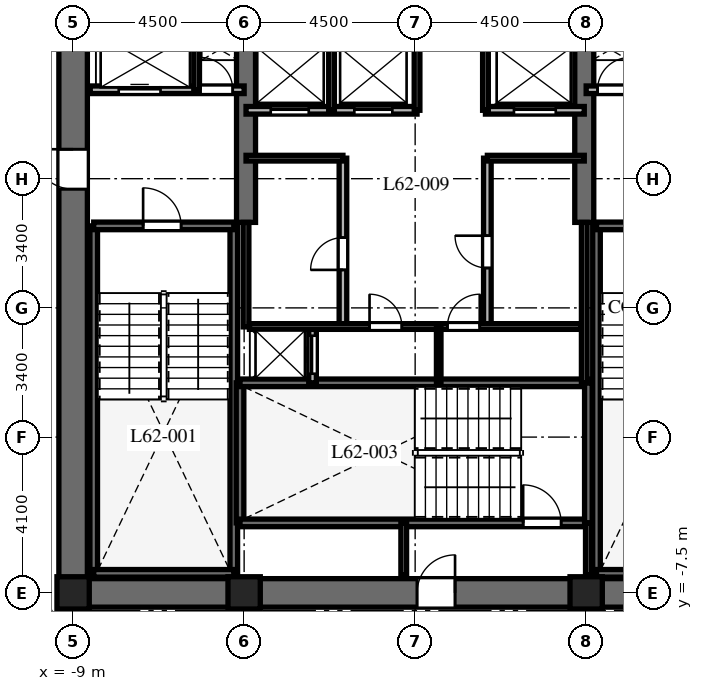
"""IFC4 building model, lengths in metres.
Left out: names, types, materials, properties, quantities, classifications, styles, units other than length and angle.
Written with IfcOpenShell. Run it as: python <this file> out.ifc"""

import sys

from ifc_helpers import new_model, si_unit, direction, frame, frame_2d, origin, origin_2d, place, context, subcontext, project, spatial, rectangle, extrude, element, fill, save


model = new_model("IFC4")
c1 = context("Model", 3, precision=1e-05, world=origin(), true_north=direction((0.0, 1.0)))
c2 = subcontext(c1, "Body", "Model", "MODEL_VIEW")
j1 = project(units=[si_unit("LENGTHUNIT", "METRE"), si_unit("PLANEANGLEUNIT", "RADIAN")], contexts=[c1])
p1 = place(None, origin())
s1 = spatial("IfcSite", under=j1, at=p1, CompositionType="ELEMENT")
p2 = place(p1, origin())
s2 = spatial("IfcBuilding", under=s1, at=p2, CompositionType="ELEMENT")
p3 = place(p2, frame((0.0, 0.0, 248.3)))
s3 = spatial("IfcBuildingStorey", under=s2, at=p3, CompositionType="ELEMENT", Elevation=248.3)
p4 = place(p3, frame((-9.375, -7.5, 0.0), z_axis=(0.0, 0.0, 1.0), x_axis=(1.0, 0.0, 0.0)))
e1 = element("IfcWall", 1, at=p4, inside=s3, PredefinedType="SHEAR", context=c2, shape_type="SweptSolid", body=[
    extrude(rectangle(XDim=18.75, YDim=0.75, at=frame_2d((9.375, 0.0))), origin(), (0.0, 0.0, 1.0), 3.8),
])
p5 = place(p4, frame((9.425, 0.0, 0.0)))
e2 = element("IfcOpeningElement", 2, at=p5, cuts=e1, PredefinedType="OPENING", context=c2, shape_type="SweptSolid", body=[
    extrude(rectangle(XDim=1.0, YDim=2.15, at=frame_2d((0.5, 1.075))), frame((0.0, 0.385, 0.0), z_axis=(0.0, -1.0, 0.0), x_axis=(1.0, 0.0, 0.0)), (0.0, 0.0, 1.0), 0.77),
])
p6 = place(p3, frame((-9.0, -7.125, 0.0), z_axis=(0.0, 0.0, 1.0), x_axis=(0.0, 1.0, 0.0)))
e3 = element("IfcWall", 3, at=p6, inside=s3, PredefinedType="SHEAR", context=c2, shape_type="SweptSolid", body=[
    extrude(rectangle(XDim=14.25, YDim=0.75, at=frame_2d((7.125, 0.0))), origin(), (0.0, 0.0, 1.0), 3.8),
])
p7 = place(p6, frame((10.25, 0.0, 0.0)))
e4 = element("IfcOpeningElement", 4, at=p7, cuts=e3, PredefinedType="OPENING", context=c2, shape_type="SweptSolid", body=[
    extrude(rectangle(XDim=1.05, YDim=2.15, at=frame_2d((0.525, 1.075))), frame((0.0, 0.385, 0.0), z_axis=(0.0, -1.0, 0.0), x_axis=(1.0, 0.0, 0.0)), (0.0, 0.0, 1.0), 0.77),
])
for number, where, z_axis, x_axis in (
    (5, (-4.45, 2.25, 0.0), (0.0, 0.0, 1.0), (0.0, 1.0, 0.0)),
    (6, (4.45, 2.25, 0.0), (0.0, 0.0, 1.0), (0.0, 1.0, 0.0)),
):
    element("IfcWall", number, at=place(p3, frame(where, z_axis=z_axis, x_axis=x_axis)), inside=s3, PredefinedType="SHEAR", context=c2, shape_type="SweptSolid", body=[
        extrude(rectangle(XDim=4.875, YDim=0.5, at=frame_2d((2.438, 0.0))), origin(), (0.0, 0.0, 1.0), 3.8),
    ])
for number, where, z_axis, x_axis in (
    (7, (-8.458, -6.985, 0.0), (0.0, 0.0, 1.0), (0.0, 1.0, 0.0)),
    (8, (-4.772, -6.985, 0.0), (0.0, 0.0, 1.0), (0.0, 1.0, 0.0)),
):
    element("IfcWall", number, at=place(p3, frame(where, z_axis=z_axis, x_axis=x_axis)), inside=s3, PredefinedType="SHEAR", context=c2, shape_type="SweptSolid", body=[
        extrude(rectangle(XDim=9.143, YDim=0.2, at=frame_2d((4.572, 0.0))), origin(), (0.0, 0.0, 1.0), 3.8),
    ])
p8 = place(p3, frame((-8.458, -6.985, 0.0), z_axis=(0.0, 0.0, 1.0), x_axis=(1.0, 0.0, 0.0)))
e9 = element("IfcWall", 9, at=p8, inside=s3, PredefinedType="SHEAR", context=c2, shape_type="SweptSolid", body=[
    extrude(rectangle(XDim=3.686, YDim=0.2, at=frame_2d((1.843, 0.0))), origin(), (0.0, 0.0, 1.0), 3.8),
])
p9 = place(p3, frame((-8.458, 2.158, 0.0), z_axis=(0.0, 0.0, 1.0), x_axis=(1.0, 0.0, 0.0)))
e10 = element("IfcWall", 10, at=p9, inside=s3, PredefinedType="SHEAR", context=c2, shape_type="SweptSolid", body=[
    extrude(rectangle(XDim=3.686, YDim=0.2, at=frame_2d((1.843, 0.0))), origin(), (0.0, 0.0, 1.0), 3.8),
])
p10 = place(p9, frame((1.3, 0.0, 0.0)))
e11 = element("IfcOpeningElement", 11, at=p10, cuts=e10, PredefinedType="OPENING", context=c2, shape_type="SweptSolid", body=[
    extrude(rectangle(XDim=1.0, YDim=2.15, at=frame_2d((0.5, 1.075))), frame((0.0, 0.11, 0.0), z_axis=(0.0, -1.0, 0.0), x_axis=(1.0, 0.0, 0.0)), (0.0, 0.0, 1.0), 0.22),
])
p11 = place(p3, frame((4.772, -6.985, 0.0), z_axis=(0.0, 0.0, 1.0), x_axis=(0.0, 1.0, 0.0)))
e12 = element("IfcWall", 12, at=p11, inside=s3, PredefinedType="SHEAR", context=c2, shape_type="SweptSolid", body=[
    extrude(rectangle(XDim=9.143, YDim=0.2, at=frame_2d((4.572, 0.0))), origin(), (0.0, 0.0, 1.0), 3.8),
])
p12 = place(p3, frame((4.772, -6.985, 0.0), z_axis=(0.0, 0.0, 1.0), x_axis=(1.0, 0.0, 0.0)))
e13 = element("IfcWall", 13, at=p12, inside=s3, PredefinedType="SHEAR", context=c2, shape_type="SweptSolid", body=[
    extrude(rectangle(XDim=3.686, YDim=0.2, at=frame_2d((1.843, 0.0))), origin(), (0.0, 0.0, 1.0), 3.8),
])
p13 = place(p3, frame((4.772, 2.158, 0.0), z_axis=(0.0, 0.0, 1.0), x_axis=(1.0, 0.0, 0.0)))
e14 = element("IfcWall", 14, at=p13, inside=s3, PredefinedType="SHEAR", context=c2, shape_type="SweptSolid", body=[
    extrude(rectangle(XDim=3.686, YDim=0.2, at=frame_2d((1.843, 0.0))), origin(), (0.0, 0.0, 1.0), 3.8),
])
p14 = place(p13, frame((1.35, 0.0, 0.0)))
e15 = element("IfcOpeningElement", 15, at=p14, cuts=e14, PredefinedType="OPENING", context=c2, shape_type="SweptSolid", body=[
    extrude(rectangle(XDim=1.0, YDim=2.15, at=frame_2d((0.5, 1.075))), frame((0.0, 0.11, 0.0), z_axis=(0.0, -1.0, 0.0), x_axis=(1.0, 0.0, 0.0)), (0.0, 0.0, 1.0), 0.22),
])
p15 = place(p3, frame((-4.608, -5.658, 0.0), z_axis=(0.0, 0.0, 1.0), x_axis=(0.0, 1.0, 0.0)))
e16 = element("IfcWall", 16, at=p15, inside=s3, PredefinedType="SHEAR", context=c2, shape_type="SweptSolid", body=[
    extrude(rectangle(XDim=3.686, YDim=0.2, at=frame_2d((1.843, 0.0))), origin(), (0.0, 0.0, 1.0), 3.8),
])
p16 = place(p3, frame((-4.608, -5.658, 0.0), z_axis=(0.0, 0.0, 1.0), x_axis=(1.0, 0.0, 0.0)))
e17 = element("IfcWall", 17, at=p16, inside=s3, PredefinedType="SHEAR", context=c2, shape_type="SweptSolid", body=[
    extrude(rectangle(XDim=9.166, YDim=0.2, at=frame_2d((4.583, 0.0))), origin(), (0.0, 0.0, 1.0), 3.8),
])
p17 = place(p16, frame((7.45, 0.0, 0.0)))
e18 = element("IfcOpeningElement", 18, at=p17, cuts=e17, PredefinedType="OPENING", context=c2, shape_type="SweptSolid", body=[
    extrude(rectangle(XDim=1.0, YDim=2.15, at=frame_2d((0.5, 1.075))), frame((0.0, 0.11, 0.0), z_axis=(0.0, -1.0, 0.0), x_axis=(1.0, 0.0, 0.0)), (0.0, 0.0, 1.0), 0.22),
])
p18 = place(p3, frame((-4.608, -1.972, 0.0), z_axis=(0.0, 0.0, 1.0), x_axis=(1.0, 0.0, 0.0)))
e19 = element("IfcWall", 19, at=p18, inside=s3, PredefinedType="SHEAR", context=c2, shape_type="SweptSolid", body=[
    extrude(rectangle(XDim=9.166, YDim=0.2, at=frame_2d((4.583, 0.0))), origin(), (0.0, 0.0, 1.0), 3.8),
])
p19 = place(p3, frame((4.558, -5.658, 0.0), z_axis=(0.0, 0.0, 1.0), x_axis=(0.0, 1.0, 0.0)))
e20 = element("IfcWall", 20, at=p19, inside=s3, PredefinedType="SHEAR", context=c2, shape_type="SweptSolid", body=[
    extrude(rectangle(XDim=3.686, YDim=0.2, at=frame_2d((1.843, 0.0))), origin(), (0.0, 0.0, 1.0), 3.8),
])
for number, where, z_axis, x_axis in (
    (21, (-9.0, -7.5, 0.0), (0.0, 0.0, 1.0), (1.0, 0.0, 0.0)),
    (22, (-4.5, -7.5, 0.0), (0.0, 0.0, 1.0), (1.0, 0.0, 0.0)),
    (23, (4.5, -7.5, 0.0), (0.0, 0.0, 1.0), (1.0, 0.0, 0.0)),
):
    element("IfcColumn", number, at=place(p3, frame(where, z_axis=z_axis, x_axis=x_axis)), inside=s3, PredefinedType="COLUMN", context=c2, shape_type="SweptSolid", body=[
        extrude(rectangle(XDim=0.85, YDim=0.85, at=origin_2d()), origin(), (0.0, 0.0, 1.0), 3.8),
    ])
for number, where, z_axis, x_axis in (
    (24, (-0.3, -7.02, 0.0), (0.0, 0.0, 1.0), (0.0, 1.0, 0.0)),
    (25, (4.558, -7.02, 0.0), (0.0, 0.0, 1.0), (0.0, 1.0, 0.0)),
):
    element("IfcWall", number, at=place(p3, frame(where, z_axis=z_axis, x_axis=x_axis)), inside=s3, PredefinedType="PARTITIONING", context=c2, shape_type="SweptSolid", body=[
        extrude(rectangle(XDim=1.362, YDim=0.15, at=frame_2d((0.681, 0.0))), origin(), (0.0, 0.0, 1.0), 3.5),
    ])
p20 = place(p3, frame((-8.55, 5.74, 0.0), z_axis=(0.0, 0.0, 1.0), x_axis=(1.0, 0.0, 0.0)))
e26 = element("IfcWall", 26, at=p20, inside=s3, PredefinedType="PARTITIONING", context=c2, shape_type="SweptSolid", body=[
    extrude(rectangle(XDim=4.05, YDim=0.2, at=frame_2d((2.025, 0.0))), origin(), (0.0, 0.0, 1.0), 3.5),
])
p21 = place(p20, frame((0.75, 0.0, 0.0)))
e27 = element("IfcOpeningElement", 27, at=p21, cuts=e26, PredefinedType="OPENING", context=c2, shape_type="SweptSolid", body=[
    extrude(rectangle(XDim=1.1, YDim=2.2, at=frame_2d((0.55, 1.1))), frame((0.0, 0.11, 0.0), z_axis=(0.0, -1.0, 0.0), x_axis=(1.0, 0.0, 0.0)), (0.0, 0.0, 1.0), 0.22),
])
p22 = place(p20, frame((2.9, 0.0, 0.0)))
e28 = element("IfcOpeningElement", 28, at=p22, cuts=e26, PredefinedType="OPENING", context=c2, shape_type="SweptSolid", body=[
    extrude(rectangle(XDim=0.85, YDim=2.03, at=frame_2d((0.425, 1.015))), frame((0.0, 0.11, 0.0), z_axis=(0.0, -1.0, 0.0), x_axis=(1.0, 0.0, 0.0)), (0.0, 0.0, 1.0), 0.22),
])
p23 = place(p3, frame((-5.75, 5.74, 0.0), z_axis=(0.0, 0.0, 1.0), x_axis=(0.0, 1.0, 0.0)))
e29 = element("IfcWall", 29, at=p23, inside=s3, PredefinedType="PARTITIONING", context=c2, shape_type="SweptSolid", body=[
    extrude(rectangle(XDim=1.41, YDim=0.15, at=frame_2d((0.705, 0.0))), origin(), (0.0, 0.0, 1.0), 3.5),
])
p24 = place(p3, frame((4.5, 5.74, 0.0), z_axis=(0.0, 0.0, 1.0), x_axis=(1.0, 0.0, 0.0)))
e30 = element("IfcWall", 30, at=p24, inside=s3, PredefinedType="PARTITIONING", context=c2, shape_type="SweptSolid", body=[
    extrude(rectangle(XDim=4.05, YDim=0.2, at=frame_2d((2.025, 0.0))), origin(), (0.0, 0.0, 1.0), 3.5),
])
p25 = place(p24, frame((0.3, 0.0, 0.0)))
e31 = element("IfcOpeningElement", 31, at=p25, cuts=e30, PredefinedType="OPENING", context=c2, shape_type="SweptSolid", body=[
    extrude(rectangle(XDim=0.85, YDim=2.03, at=frame_2d((0.425, 1.015))), frame((0.0, 0.11, 0.0), z_axis=(0.0, -1.0, 0.0), x_axis=(1.0, 0.0, 0.0)), (0.0, 0.0, 1.0), 0.22),
])
p26 = place(p24, frame((2.15, 0.0, 0.0)))
e32 = element("IfcOpeningElement", 32, at=p26, cuts=e30, PredefinedType="OPENING", context=c2, shape_type="SweptSolid", body=[
    extrude(rectangle(XDim=1.1, YDim=2.2, at=frame_2d((0.55, 1.1))), frame((0.0, 0.11, 0.0), z_axis=(0.0, -1.0, 0.0), x_axis=(1.0, 0.0, 0.0)), (0.0, 0.0, 1.0), 0.22),
])
p27 = place(p3, frame((-2.7, -1.972, 0.0), z_axis=(0.0, 0.0, 1.0), x_axis=(0.0, 1.0, 0.0)))
e33 = element("IfcWall", 33, at=p27, inside=s3, PredefinedType="PARTITIONING", context=c2, shape_type="SweptSolid", body=[
    extrude(rectangle(XDim=1.472, YDim=0.2, at=frame_2d((0.736, 0.0))), origin(), (0.0, 0.0, 1.0), 3.5),
])
p28 = place(p27, frame((0.24, 0.0, 0.0)))
e34 = element("IfcOpeningElement", 34, at=p28, cuts=e33, PredefinedType="OPENING", context=c2, shape_type="SweptSolid", body=[
    extrude(rectangle(XDim=1.0, YDim=2.2, at=frame_2d((0.5, 1.1))), frame((0.0, 0.11, 0.0), z_axis=(0.0, -1.0, 0.0), x_axis=(1.0, 0.0, 0.0)), (0.0, 0.0, 1.0), 0.22),
])
p29 = place(p3, frame((-4.45, 5.2, 0.0), z_axis=(0.0, 0.0, 1.0), x_axis=(1.0, 0.0, 0.0)))
e35 = element("IfcWall", 35, at=p29, inside=s3, PredefinedType="PARTITIONING", context=c2, shape_type="SweptSolid", body=[
    extrude(rectangle(XDim=4.5, YDim=0.2, at=frame_2d((2.25, 0.0))), origin(), (0.0, 0.0, 1.0), 3.5),
])
p30 = place(p29, frame((0.65, 0.0, 0.0)))
e36 = element("IfcOpeningElement", 36, at=p30, cuts=e35, PredefinedType="OPENING", context=c2, shape_type="SweptSolid", body=[
    extrude(rectangle(XDim=1.0, YDim=2.2, at=frame_2d((0.5, 1.1))), frame((0.0, 0.11, 0.0), z_axis=(0.0, -1.0, 0.0), x_axis=(1.0, 0.0, 0.0)), (0.0, 0.0, 1.0), 0.22),
])
p31 = place(p29, frame((2.85, 0.0, 0.0)))
e37 = element("IfcOpeningElement", 37, at=p31, cuts=e35, PredefinedType="OPENING", context=c2, shape_type="SweptSolid", body=[
    extrude(rectangle(XDim=1.0, YDim=2.2, at=frame_2d((0.5, 1.1))), frame((0.0, 0.11, 0.0), z_axis=(0.0, -1.0, 0.0), x_axis=(1.0, 0.0, 0.0)), (0.0, 0.0, 1.0), 0.22),
])
p32 = place(p3, frame((1.85, 5.2, 0.0), z_axis=(0.0, 0.0, 1.0), x_axis=(1.0, 0.0, 0.0)))
e38 = element("IfcWall", 38, at=p32, inside=s3, PredefinedType="PARTITIONING", context=c2, shape_type="SweptSolid", body=[
    extrude(rectangle(XDim=2.6, YDim=0.2, at=frame_2d((1.3, 0.0))), origin(), (0.0, 0.0, 1.0), 3.5),
])
p33 = place(p32, frame((0.75, 0.0, 0.0)))
e39 = element("IfcOpeningElement", 39, at=p33, cuts=e38, PredefinedType="OPENING", context=c2, shape_type="SweptSolid", body=[
    extrude(rectangle(XDim=1.1, YDim=2.2, at=frame_2d((0.55, 1.1))), frame((0.0, 0.11, 0.0), z_axis=(0.0, -1.0, 0.0), x_axis=(1.0, 0.0, 0.0)), (0.0, 0.0, 1.0), 0.22),
])
p34 = place(p3, frame((-2.2, 5.2, 0.0), z_axis=(0.0, 0.0, 1.0), x_axis=(0.0, 1.0, 0.0)))
e40 = element("IfcWall", 40, at=p34, inside=s3, PredefinedType="PARTITIONING", context=c2, shape_type="SweptSolid", body=[
    extrude(rectangle(XDim=1.85, YDim=0.15, at=frame_2d((0.925, 0.0))), origin(), (0.0, 0.0, 1.0), 3.5),
])
for number, where, z_axis, x_axis in (
    (41, (0.05, 5.2, 0.0), (0.0, 0.0, 1.0), (0.0, 1.0, 0.0)),
    (42, (1.85, 5.2, 0.0), (0.0, 0.0, 1.0), (0.0, 1.0, 0.0)),
):
    element("IfcWall", number, at=place(p3, frame(where, z_axis=z_axis, x_axis=x_axis)), inside=s3, PredefinedType="PARTITIONING", context=c2, shape_type="SweptSolid", body=[
        extrude(rectangle(XDim=1.95, YDim=0.15, at=frame_2d((0.975, 0.0))), origin(), (0.0, 0.0, 1.0), 3.5),
    ])
p35 = place(p3, frame((-4.45, -0.5, 0.0), z_axis=(0.0, 0.0, 1.0), x_axis=(0.0, 1.0, 0.0)))
e43 = element("IfcWall", 43, at=p35, inside=s3, PredefinedType="PARTITIONING", context=c2, shape_type="SweptSolid", body=[
    extrude(rectangle(XDim=2.75, YDim=0.15, at=frame_2d((1.375, 0.0))), origin(), (0.0, 0.0, 1.0), 3.5),
])
p36 = place(p3, frame((4.45, -1.972, 0.0), z_axis=(0.0, 0.0, 1.0), x_axis=(0.0, 1.0, 0.0)))
e44 = element("IfcWall", 44, at=p36, inside=s3, PredefinedType="PARTITIONING", context=c2, shape_type="SweptSolid", body=[
    extrude(rectangle(XDim=4.222, YDim=0.15, at=frame_2d((2.111, 0.0))), origin(), (0.0, 0.0, 1.0), 3.5),
])
p37 = place(p3, frame((-1.9, -0.5, 0.0), z_axis=(0.0, 0.0, 1.0), x_axis=(0.0, 1.0, 0.0)))
e45 = element("IfcWall", 45, at=p37, inside=s3, PredefinedType="PARTITIONING", context=c2, shape_type="SweptSolid", body=[
    extrude(rectangle(XDim=4.44, YDim=0.2, at=frame_2d((2.22, 0.0))), origin(), (0.0, 0.0, 1.0), 3.5),
])
p38 = place(p37, frame((1.5, 0.0, 0.0)))
e46 = element("IfcOpeningElement", 46, at=p38, cuts=e45, PredefinedType="OPENING", context=c2, shape_type="SweptSolid", body=[
    extrude(rectangle(XDim=0.85, YDim=2.03, at=frame_2d((0.425, 1.015))), frame((0.0, 0.11, 0.0), z_axis=(0.0, -1.0, 0.0), x_axis=(1.0, 0.0, 0.0)), (0.0, 0.0, 1.0), 0.22),
])
p39 = place(p3, frame((-4.45, 3.94, 0.0), z_axis=(0.0, 0.0, 1.0), x_axis=(1.0, 0.0, 0.0)))
e47 = element("IfcWall", 47, at=p39, inside=s3, PredefinedType="PARTITIONING", context=c2, shape_type="SweptSolid", body=[
    extrude(rectangle(XDim=2.55, YDim=0.15, at=frame_2d((1.275, 0.0))), origin(), (0.0, 0.0, 1.0), 3.5),
])
p40 = place(p3, frame((1.9, -0.5, 0.0), z_axis=(0.0, 0.0, 1.0), x_axis=(0.0, 1.0, 0.0)))
e48 = element("IfcWall", 48, at=p40, inside=s3, PredefinedType="PARTITIONING", context=c2, shape_type="SweptSolid", body=[
    extrude(rectangle(XDim=4.44, YDim=0.2, at=frame_2d((2.22, 0.0))), origin(), (0.0, 0.0, 1.0), 3.5),
])
p41 = place(p40, frame((1.55, 0.0, 0.0)))
e49 = element("IfcOpeningElement", 49, at=p41, cuts=e48, PredefinedType="OPENING", context=c2, shape_type="SweptSolid", body=[
    extrude(rectangle(XDim=0.85, YDim=2.03, at=frame_2d((0.425, 1.015))), frame((0.0, 0.11, 0.0), z_axis=(0.0, -1.0, 0.0), x_axis=(1.0, 0.0, 0.0)), (0.0, 0.0, 1.0), 0.22),
])
p42 = place(p3, frame((1.9, 3.94, 0.0), z_axis=(0.0, 0.0, 1.0), x_axis=(1.0, 0.0, 0.0)))
e50 = element("IfcWall", 50, at=p42, inside=s3, PredefinedType="PARTITIONING", context=c2, shape_type="SweptSolid", body=[
    extrude(rectangle(XDim=2.55, YDim=0.15, at=frame_2d((1.275, 0.0))), origin(), (0.0, 0.0, 1.0), 3.5),
])
p43 = place(p3, frame((-4.36, -0.49, 0.0), z_axis=(0.0, 0.0, 1.0), x_axis=(1.0, 0.0, 0.0)))
e51 = element("IfcWall", 51, at=p43, inside=s3, PredefinedType="PARTITIONING", context=c2, shape_type="SweptSolid", body=[
    extrude(rectangle(XDim=8.72, YDim=0.15, at=frame_2d((4.36, 0.0))), origin(), (0.0, 0.0, 1.0), 3.5),
])
p44 = place(p43, frame((3.16, 0.0, 0.0)))
e52 = element("IfcOpeningElement", 52, at=p44, cuts=e51, PredefinedType="OPENING", context=c2, shape_type="SweptSolid", body=[
    extrude(rectangle(XDim=0.85, YDim=2.03, at=frame_2d((0.425, 1.015))), frame((0.0, 0.085, 0.0), z_axis=(0.0, -1.0, 0.0), x_axis=(1.0, 0.0, 0.0)), (0.0, 0.0, 1.0), 0.17),
])
p45 = place(p43, frame((5.21, 0.0, 0.0)))
e53 = element("IfcOpeningElement", 53, at=p45, cuts=e51, PredefinedType="OPENING", context=c2, shape_type="SweptSolid", body=[
    extrude(rectangle(XDim=0.85, YDim=2.03, at=frame_2d((0.425, 1.015))), frame((0.0, 0.085, 0.0), z_axis=(0.0, -1.0, 0.0), x_axis=(1.0, 0.0, 0.0)), (0.0, 0.0, 1.0), 0.17),
])
p46 = place(p3, frame((0.62, -1.972, 0.0), z_axis=(0.0, 0.0, 1.0), x_axis=(0.0, 1.0, 0.0)))
e54 = element("IfcWall", 54, at=p46, inside=s3, PredefinedType="PARTITIONING", context=c2, shape_type="SweptSolid", body=[
    extrude(rectangle(XDim=1.472, YDim=0.12, at=frame_2d((0.736, 0.0))), origin(), (0.0, 0.0, 1.0), 3.5),
])
p47 = place(p10, origin())
e55 = element("IfcDoor", 55, at=p47, inside=s3, OperationType="SINGLE_SWING_LEFT", PredefinedType="DOOR", context=c2, shape_type="SweptSolid", body=[
    extrude(rectangle(XDim=1.0, YDim=2.15, at=frame_2d((0.5, 1.075))), frame((0.0, 0.025, 0.0), z_axis=(0.0, -1.0, 0.0), x_axis=(1.0, 0.0, 0.0)), (0.0, 0.0, 1.0), 0.05),
])
fill(e11, e55)
p48 = place(p17, origin())
e56 = element("IfcDoor", 56, at=p48, inside=s3, OperationType="SINGLE_SWING_LEFT", PredefinedType="DOOR", context=c2, shape_type="SweptSolid", body=[
    extrude(rectangle(XDim=1.0, YDim=2.15, at=frame_2d((0.5, 1.075))), frame((0.0, 0.025, 0.0), z_axis=(0.0, -1.0, 0.0), x_axis=(1.0, 0.0, 0.0)), (0.0, 0.0, 1.0), 0.05),
])
fill(e18, e56)
p49 = place(p5, origin())
e57 = element("IfcDoor", 57, at=p49, inside=s3, OperationType="SINGLE_SWING_RIGHT", PredefinedType="DOOR", context=c2, shape_type="SweptSolid", body=[
    extrude(rectangle(XDim=1.0, YDim=2.15, at=frame_2d((0.5, 1.075))), frame((0.0, 0.025, 0.0), z_axis=(0.0, -1.0, 0.0), x_axis=(1.0, 0.0, 0.0)), (0.0, 0.0, 1.0), 0.05),
])
fill(e2, e57)
p50 = place(p7, origin())
e58 = element("IfcDoor", 58, at=p50, inside=s3, OperationType="SINGLE_SWING_RIGHT", PredefinedType="DOOR", context=c2, shape_type="SweptSolid", body=[
    extrude(rectangle(XDim=1.05, YDim=2.15, at=frame_2d((0.525, 1.075))), frame((0.0, 0.025, 0.0), z_axis=(0.0, -1.0, 0.0), x_axis=(1.0, 0.0, 0.0)), (0.0, 0.0, 1.0), 0.05),
])
fill(e4, e58)
p51 = place(p21, origin())
e59 = element("IfcDoor", 59, at=p51, inside=s3, OperationType="SLIDING_TO_LEFT", PredefinedType="DOOR", context=c2, shape_type="SweptSolid", body=[
    extrude(rectangle(XDim=1.1, YDim=2.2, at=frame_2d((0.55, 1.1))), frame((0.0, 0.025, 0.0), z_axis=(0.0, -1.0, 0.0), x_axis=(1.0, 0.0, 0.0)), (0.0, 0.0, 1.0), 0.05),
])
fill(e27, e59)
p52 = place(p22, origin())
e60 = element("IfcDoor", 60, at=p52, inside=s3, OperationType="SINGLE_SWING_LEFT", PredefinedType="DOOR", context=c2, shape_type="SweptSolid", body=[
    extrude(rectangle(XDim=0.85, YDim=2.03, at=frame_2d((0.425, 1.015))), frame((0.0, 0.025, 0.0), z_axis=(0.0, -1.0, 0.0), x_axis=(1.0, 0.0, 0.0)), (0.0, 0.0, 1.0), 0.05),
])
fill(e28, e60)
p53 = place(p25, origin())
e61 = element("IfcDoor", 61, at=p53, inside=s3, OperationType="SINGLE_SWING_RIGHT", PredefinedType="DOOR", context=c2, shape_type="SweptSolid", body=[
    extrude(rectangle(XDim=0.85, YDim=2.03, at=frame_2d((0.425, 1.015))), frame((0.0, 0.025, 0.0), z_axis=(0.0, -1.0, 0.0), x_axis=(1.0, 0.0, 0.0)), (0.0, 0.0, 1.0), 0.05),
])
fill(e31, e61)
p54 = place(p28, origin())
e62 = element("IfcDoor", 62, at=p54, inside=s3, OperationType="SLIDING_TO_LEFT", PredefinedType="DOOR", context=c2, shape_type="SweptSolid", body=[
    extrude(rectangle(XDim=1.0, YDim=2.2, at=frame_2d((0.5, 1.1))), frame((0.0, 0.025, 0.0), z_axis=(0.0, -1.0, 0.0), x_axis=(1.0, 0.0, 0.0)), (0.0, 0.0, 1.0), 0.05),
])
fill(e34, e62)
p55 = place(p30, origin())
e63 = element("IfcDoor", 63, at=p55, inside=s3, OperationType="SLIDING_TO_LEFT", PredefinedType="DOOR", context=c2, shape_type="SweptSolid", body=[
    extrude(rectangle(XDim=1.0, YDim=2.2, at=frame_2d((0.5, 1.1))), frame((0.0, 0.025, 0.0), z_axis=(0.0, -1.0, 0.0), x_axis=(1.0, 0.0, 0.0)), (0.0, 0.0, 1.0), 0.05),
])
fill(e36, e63)
p56 = place(p31, origin())
e64 = element("IfcDoor", 64, at=p56, inside=s3, OperationType="SLIDING_TO_RIGHT", PredefinedType="DOOR", context=c2, shape_type="SweptSolid", body=[
    extrude(rectangle(XDim=1.0, YDim=2.2, at=frame_2d((0.5, 1.1))), frame((0.0, 0.025, 0.0), z_axis=(0.0, -1.0, 0.0), x_axis=(1.0, 0.0, 0.0)), (0.0, 0.0, 1.0), 0.05),
])
fill(e37, e64)
p57 = place(p33, origin())
e65 = element("IfcDoor", 65, at=p57, inside=s3, OperationType="SLIDING_TO_RIGHT", PredefinedType="DOOR", context=c2, shape_type="SweptSolid", body=[
    extrude(rectangle(XDim=1.1, YDim=2.2, at=frame_2d((0.55, 1.1))), frame((0.0, 0.025, 0.0), z_axis=(0.0, -1.0, 0.0), x_axis=(1.0, 0.0, 0.0)), (0.0, 0.0, 1.0), 0.05),
])
fill(e39, e65)
p58 = place(p38, origin())
e66 = element("IfcDoor", 66, at=p58, inside=s3, OperationType="SINGLE_SWING_LEFT", PredefinedType="DOOR", context=c2, shape_type="SweptSolid", body=[
    extrude(rectangle(XDim=0.85, YDim=2.03, at=frame_2d((0.425, 1.015))), frame((0.0, 0.025, 0.0), z_axis=(0.0, -1.0, 0.0), x_axis=(1.0, 0.0, 0.0)), (0.0, 0.0, 1.0), 0.05),
])
fill(e46, e66)
p59 = place(p41, origin())
e67 = element("IfcDoor", 67, at=p59, inside=s3, OperationType="SINGLE_SWING_RIGHT", PredefinedType="DOOR", context=c2, shape_type="SweptSolid", body=[
    extrude(rectangle(XDim=0.85, YDim=2.03, at=frame_2d((0.425, 1.015))), frame((0.0, 0.025, 0.0), z_axis=(0.0, -1.0, 0.0), x_axis=(1.0, 0.0, 0.0)), (0.0, 0.0, 1.0), 0.05),
])
fill(e49, e67)
p60 = place(p44, origin())
e68 = element("IfcDoor", 68, at=p60, inside=s3, OperationType="SINGLE_SWING_LEFT", PredefinedType="DOOR", context=c2, shape_type="SweptSolid", body=[
    extrude(rectangle(XDim=0.85, YDim=2.03, at=frame_2d((0.425, 1.015))), frame((0.0, 0.025, 0.0), z_axis=(0.0, -1.0, 0.0), x_axis=(1.0, 0.0, 0.0)), (0.0, 0.0, 1.0), 0.05),
])
fill(e52, e68)
p61 = place(p45, origin())
e69 = element("IfcDoor", 69, at=p61, inside=s3, OperationType="SINGLE_SWING_RIGHT", PredefinedType="DOOR", context=c2, shape_type="SweptSolid", body=[
    extrude(rectangle(XDim=0.85, YDim=2.03, at=frame_2d((0.425, 1.015))), frame((0.0, 0.025, 0.0), z_axis=(0.0, -1.0, 0.0), x_axis=(1.0, 0.0, 0.0)), (0.0, 0.0, 1.0), 0.05),
])
fill(e53, e69)
save(model, sys.argv[1])
